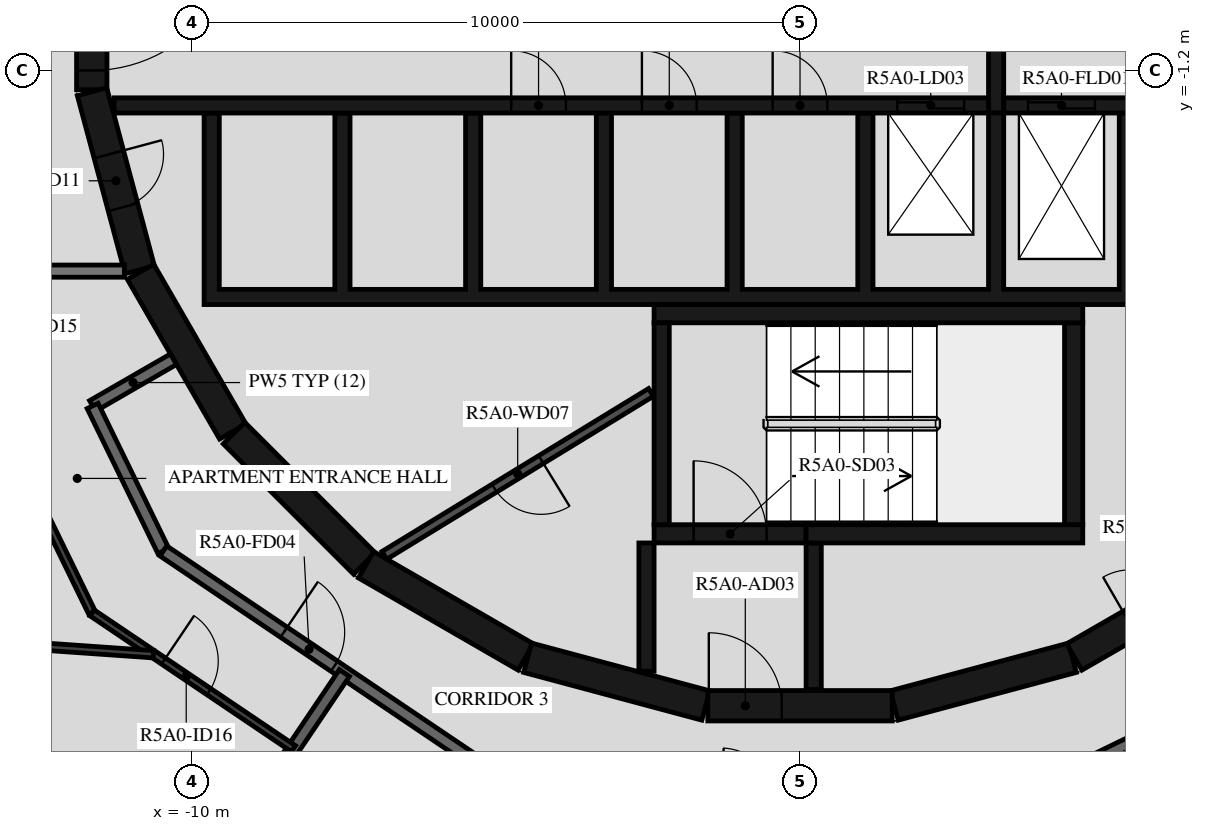
"""IFC4 building model, lengths in metres.
Left out: names, types, materials, properties, quantities, classifications, styles, units other than length and angle.
Written with IfcOpenShell. Run it as: python <this file> out.ifc"""

import sys

from ifc_helpers import new_model, si_unit, direction, frame, frame_2d, origin, place, context, subcontext, project, spatial, polyline, rectangle, outline, extrude, element, fill, save


model = new_model("IFC4")
c1 = context("Model", 3, precision=1e-05, world=origin(), true_north=direction((0.0, 1.0)))
c2 = subcontext(c1, "Body", "Model", "MODEL_VIEW")
j1 = project(units=[si_unit("LENGTHUNIT", "METRE"), si_unit("PLANEANGLEUNIT", "RADIAN")], contexts=[c1])
p1 = place(None, origin())
s1 = spatial("IfcSite", under=j1, at=p1, CompositionType="ELEMENT")
p2 = place(p1, origin())
s2 = spatial("IfcBuilding", under=s1, at=p2, CompositionType="ELEMENT")
p3 = place(p2, frame((0.0, 0.0, 188.4)))
s3 = spatial("IfcBuildingStorey", under=s2, at=p3, CompositionType="ELEMENT", Elevation=188.4)
p4 = place(p3, frame((1.55, -11.643, 0.0), z_axis=(0.0, 0.0, 1.0), x_axis=(0.965948410781, 0.258734743916, 0.0)))
e1 = element("IfcWall", 1, at=p4, inside=s3, PredefinedType="SHEAR", context=c2, shape_type="SweptSolid", body=[
    extrude(rectangle(XDim=3.033, YDim=0.5, at=frame_2d((1.516, 0.0))), origin(), (0.0, 0.0, 1.0), 3.12),
])
p5 = place(p3, frame((4.51, -10.845, 0.0), z_axis=(0.0, 0.0, 1.0), x_axis=(0.865975092491, 0.500087131594, 0.0)))
e2 = element("IfcWall", 2, at=p5, inside=s3, PredefinedType="SHEAR", context=c2, shape_type="SweptSolid", body=[
    extrude(rectangle(XDim=3.033, YDim=0.5, at=frame_2d((1.516, 0.0))), origin(), (0.0, 0.0, 1.0), 3.12),
])
p6 = place(p5, frame((1.066, 0.0, 0.0)))
e3 = element("IfcOpeningElement", 3, at=p6, cuts=e2, PredefinedType="OPENING", context=c2, shape_type="SweptSolid", body=[
    extrude(rectangle(XDim=0.9, YDim=2.1, at=frame_2d((0.45, 1.05))), frame((0.0, 0.26, 0.0), z_axis=(0.0, -1.0, 0.0), x_axis=(1.0, 0.0, 0.0)), (0.0, 0.0, 1.0), 0.52),
])
p7 = place(p3, frame((-11.647, 1.516, 0.0), z_axis=(0.0, 0.0, 1.0), x_axis=(0.0, -1.0, 0.0)))
e4 = element("IfcWall", 4, at=p7, inside=s3, PredefinedType="SHEAR", context=c2, shape_type="SweptSolid", body=[
    extrude(rectangle(XDim=3.033, YDim=0.5, at=frame_2d((1.516, 0.0))), origin(), (0.0, 0.0, 1.0), 3.12),
])
p8 = place(p7, frame((0.316, 0.0, 0.0)))
e5 = element("IfcOpeningElement", 5, at=p8, cuts=e4, PredefinedType="OPENING", context=c2, shape_type="SweptSolid", body=[
    extrude(rectangle(XDim=2.4, YDim=2.1, at=frame_2d((1.2, 1.05))), frame((0.0, 0.26, 0.0), z_axis=(0.0, -1.0, 0.0), x_axis=(1.0, 0.0, 0.0)), (0.0, 0.0, 1.0), 0.52),
])
p9 = place(p3, frame((-11.643, -1.55, 0.0), z_axis=(0.0, 0.0, 1.0), x_axis=(0.258734743916, -0.965948410781, 0.0)))
e6 = element("IfcWall", 6, at=p9, inside=s3, PredefinedType="SHEAR", context=c2, shape_type="SweptSolid", body=[
    extrude(rectangle(XDim=3.033, YDim=0.5, at=frame_2d((1.516, 0.0))), origin(), (0.0, 0.0, 1.0), 3.12),
])
p10 = place(p9, frame((1.066, 0.0, 0.0)))
e7 = element("IfcOpeningElement", 7, at=p10, cuts=e6, PredefinedType="OPENING", context=c2, shape_type="SweptSolid", body=[
    extrude(rectangle(XDim=0.9, YDim=2.1, at=frame_2d((0.45, 1.05))), frame((0.0, 0.26, 0.0), z_axis=(0.0, -1.0, 0.0), x_axis=(1.0, 0.0, 0.0)), (0.0, 0.0, 1.0), 0.52),
])
p11 = place(p3, frame((-10.845, -4.51, 0.0), z_axis=(0.0, 0.0, 1.0), x_axis=(0.500087131594, -0.865975092491, 0.0)))
e8 = element("IfcWall", 8, at=p11, inside=s3, PredefinedType="SHEAR", context=c2, shape_type="SweptSolid", body=[
    extrude(rectangle(XDim=3.033, YDim=0.5, at=frame_2d((1.516, 0.0))), origin(), (0.0, 0.0, 1.0), 3.12),
])
p12 = place(p3, frame((-9.308, -7.164, 0.0), z_axis=(0.0, 0.0, 1.0), x_axis=(0.707106781187, -0.707106781187, 0.0)))
e9 = element("IfcWall", 9, at=p12, inside=s3, PredefinedType="SHEAR", context=c2, shape_type="SweptSolid", body=[
    extrude(rectangle(XDim=3.032, YDim=0.5, at=frame_2d((1.516, 0.0))), origin(), (0.0, 0.0, 1.0), 3.12),
])
for number, where, z_axis, x_axis in (
    (10, (-7.137, -9.329, 0.0), (0.0, 0.0, 1.0), (0.866, -0.5, 0.0)),
    (11, (-4.479, -10.858, 0.0), (0.0, 0.0, 1.0), (0.966, -0.259, 0.0)),
):
    element("IfcWall", number, at=place(p3, frame(where, z_axis=z_axis, x_axis=x_axis)), inside=s3, PredefinedType="SHEAR", context=c2, shape_type="SweptSolid", body=[
        extrude(rectangle(XDim=3.033, YDim=0.5, at=frame_2d((1.516, 0.0))), origin(), (0.0, 0.0, 1.0), 3.12),
    ])
p13 = place(p3, frame((-1.516, -11.647, 0.0), z_axis=(0.0, 0.0, 1.0), x_axis=(1.0, 0.0, 0.0)))
e12 = element("IfcWall", 12, at=p13, inside=s3, PredefinedType="SHEAR", context=c2, shape_type="SweptSolid", body=[
    extrude(rectangle(XDim=3.033, YDim=0.5, at=frame_2d((1.516, 0.0))), origin(), (0.0, 0.0, 1.0), 3.12),
])
p14 = place(p13, frame((0.016, 0.0, 0.0)))
e13 = element("IfcOpeningElement", 13, at=p14, cuts=e12, PredefinedType="OPENING", context=c2, shape_type="SweptSolid", body=[
    extrude(rectangle(XDim=1.2, YDim=2.1, at=frame_2d((0.6, 1.05))), frame((0.0, 0.26, 0.0), z_axis=(0.0, -1.0, 0.0), x_axis=(1.0, 0.0, 0.0)), (0.0, 0.0, 1.0), 0.52),
])
p15 = place(p3, frame((-2.275, -8.67, 0.0), z_axis=(0.0, 0.0, 1.0), x_axis=(0.0, 1.0, 0.0)))
e14 = element("IfcWall", 14, at=p15, inside=s3, PredefinedType="SHEAR", context=c2, shape_type="SweptSolid", body=[
    extrude(rectangle(XDim=3.32, YDim=0.25, at=frame_2d((1.66, 0.0))), origin(), (0.0, 0.0, 1.0), 3.12),
])
p16 = place(p3, frame((-2.4, -5.2, 0.0), z_axis=(0.0, 0.0, 1.0), x_axis=(1.0, 0.0, 0.0)))
e15 = element("IfcWall", 15, at=p16, inside=s3, PredefinedType="SHEAR", context=c2, shape_type="SweptSolid", body=[
    extrude(rectangle(XDim=7.05, YDim=0.3, at=frame_2d((3.525, 0.0))), origin(), (0.0, 0.0, 1.0), 3.12),
])
p17 = place(p3, frame((4.5, -8.67, 0.0), z_axis=(0.0, 0.0, 1.0), x_axis=(0.0, 1.0, 0.0)))
e16 = element("IfcWall", 16, at=p17, inside=s3, PredefinedType="SHEAR", context=c2, shape_type="SweptSolid", body=[
    extrude(rectangle(XDim=3.32, YDim=0.3, at=frame_2d((1.66, 0.0))), origin(), (0.0, 0.0, 1.0), 3.12),
])
p18 = place(p3, frame((0.1, -8.82, 0.0), z_axis=(0.0, 0.0, 1.0), x_axis=(1.0, 0.0, 0.0)))
e17 = element("IfcWall", 17, at=p18, inside=s3, PredefinedType="SHEAR", context=c2, shape_type="SweptSolid", body=[
    extrude(rectangle(XDim=4.55, YDim=0.3, at=frame_2d((2.275, 0.0))), origin(), (0.0, 0.0, 1.0), 3.12),
])
p19 = place(p3, frame((-2.4, -8.82, 0.0), z_axis=(0.0, 0.0, 1.0), x_axis=(1.0, 0.0, 0.0)))
e18 = element("IfcWall", 18, at=p19, inside=s3, PredefinedType="SHEAR", context=c2, shape_type="SweptSolid", body=[
    extrude(rectangle(XDim=2.5, YDim=0.3, at=frame_2d((1.25, 0.0))), origin(), (0.0, 0.0, 1.0), 3.12),
])
p20 = place(p19, frame((0.65, 0.0, 0.0)))
e19 = element("IfcOpeningElement", 19, at=p20, cuts=e18, PredefinedType="OPENING", context=c2, shape_type="SweptSolid", body=[
    extrude(rectangle(XDim=1.2, YDim=2.1, at=frame_2d((0.6, 1.05))), frame((0.0, 0.16, 0.0), z_axis=(0.0, -1.0, 0.0), x_axis=(1.0, 0.0, 0.0)), (0.0, 0.0, 1.0), 0.32),
])
p21 = place(p3, frame((-2.525, -8.97, 0.0), z_axis=(0.0, 0.0, 1.0), x_axis=(0.0, -1.0, 0.0)))
e20 = element("IfcWall", 20, at=p21, inside=s3, PredefinedType="SHEAR", context=c2, shape_type="SweptSolid", body=[
    extrude(rectangle(XDim=2.11, YDim=0.25, at=frame_2d((1.055, 0.0))), origin(), (0.0, 0.0, 1.0), 3.12),
])
p22 = place(p3, frame((0.225, -8.97, 0.0), z_axis=(0.0, 0.0, 1.0), x_axis=(0.0, -1.0, 0.0)))
e21 = element("IfcWall", 21, at=p22, inside=s3, PredefinedType="SHEAR", context=c2, shape_type="SweptSolid", body=[
    extrude(rectangle(XDim=2.41, YDim=0.25, at=frame_2d((1.205, 0.0))), origin(), (0.0, 0.0, 1.0), 3.12),
])
p23 = place(p3, origin())
e22 = element("IfcWall", 22, at=p23, inside=s3, PredefinedType="SHEAR", context=c2, shape_type="SweptSolid", body=[
    extrude(outline(polyline([(9.8, -5.05), (9.8, -4.8), (9.8, -1.9), (9.55, -1.9), (9.55, -4.8), (7.65, -4.8), (7.65, -1.9), (7.4, -1.9), (7.4, -4.8), (5.5, -4.8), (5.5, -1.9), (5.25, -1.9), (5.25, -4.8), (3.35, -4.8), (3.35, -1.9), (3.1, -1.9), (3.1, -4.8), (1.2, -4.8), (1.2, -1.9), (0.95, -1.9), (0.95, -4.8), (-0.95, -4.8), (-0.95, -1.9), (-1.2, -1.9), (-1.2, -4.8), (-3.1, -4.8), (-3.1, -1.9), (-3.35, -1.9), (-3.35, -4.8), (-5.25, -4.8), (-5.25, -1.9), (-5.5, -1.9), (-5.5, -4.8), (-7.4, -4.8), (-7.4, -1.9), (-7.65, -1.9), (-7.65, -4.8), (-9.55, -4.8), (-9.55, -1.9), (-9.8, -1.9), (-9.8, -4.8), (-9.8, -5.05), (9.8, -5.05)])), origin(), (0.0, 0.0, 1.0), 3.12),
])
p24 = place(p3, frame((-11.28, -1.775, 0.0), z_axis=(0.0, 0.0, 1.0), x_axis=(1.0, 0.0, 0.0)))
e23 = element("IfcWall", 23, at=p24, inside=s3, PredefinedType="SHEAR", context=c2, shape_type="SweptSolid", body=[
    extrude(rectangle(XDim=14.38, YDim=0.25, at=frame_2d((7.19, 0.0))), origin(), (0.0, 0.0, 1.0), 3.12),
])
p25 = place(p24, frame((12.88, 0.0, 0.0)))
e24 = element("IfcOpeningElement", 24, at=p25, cuts=e23, PredefinedType="OPENING", context=c2, shape_type="SweptSolid", body=[
    extrude(rectangle(XDim=1.1, YDim=2.1, at=frame_2d((0.55, 1.05))), frame((0.0, 0.135, 0.0), z_axis=(0.0, -1.0, 0.0), x_axis=(1.0, 0.0, 0.0)), (0.0, 0.0, 1.0), 0.27),
])
p26 = place(p24, frame((6.53, 0.0, 0.0)))
e25 = element("IfcOpeningElement", 25, at=p26, cuts=e23, PredefinedType="OPENING", context=c2, shape_type="SweptSolid", body=[
    extrude(rectangle(XDim=0.9, YDim=2.1, at=frame_2d((0.45, 1.05))), frame((0.0, 0.135, 0.0), z_axis=(0.0, -1.0, 0.0), x_axis=(1.0, 0.0, 0.0)), (0.0, 0.0, 1.0), 0.27),
])
p27 = place(p24, frame((8.68, 0.0, 0.0)))
e26 = element("IfcOpeningElement", 26, at=p27, cuts=e23, PredefinedType="OPENING", context=c2, shape_type="SweptSolid", body=[
    extrude(rectangle(XDim=0.9, YDim=2.1, at=frame_2d((0.45, 1.05))), frame((0.0, 0.135, 0.0), z_axis=(0.0, -1.0, 0.0), x_axis=(1.0, 0.0, 0.0)), (0.0, 0.0, 1.0), 0.27),
])
p28 = place(p24, frame((10.83, 0.0, 0.0)))
e27 = element("IfcOpeningElement", 27, at=p28, cuts=e23, PredefinedType="OPENING", context=c2, shape_type="SweptSolid", body=[
    extrude(rectangle(XDim=0.9, YDim=2.1, at=frame_2d((0.45, 1.05))), frame((0.0, 0.135, 0.0), z_axis=(0.0, -1.0, 0.0), x_axis=(1.0, 0.0, 0.0)), (0.0, 0.0, 1.0), 0.27),
])
p29 = place(p3, frame((3.35, -1.775, 0.0), z_axis=(0.0, 0.0, 1.0), x_axis=(1.0, 0.0, 0.0)))
e28 = element("IfcWall", 28, at=p29, inside=s3, PredefinedType="SHEAR", context=c2, shape_type="SweptSolid", body=[
    extrude(rectangle(XDim=7.93, YDim=0.25, at=frame_2d((3.965, 0.0))), origin(), (0.0, 0.0, 1.0), 3.12),
])
p30 = place(p29, frame((0.4, 0.0, 0.0)))
e29 = element("IfcOpeningElement", 29, at=p30, cuts=e28, PredefinedType="OPENING", context=c2, shape_type="SweptSolid", body=[
    extrude(rectangle(XDim=1.1, YDim=2.4, at=frame_2d((0.55, 1.2))), frame((0.0, 0.135, 0.0), z_axis=(0.0, -1.0, 0.0), x_axis=(1.0, 0.0, 0.0)), (0.0, 0.0, 1.0), 0.27),
])
p31 = place(p29, frame((2.55, 0.0, 0.0)))
e30 = element("IfcOpeningElement", 30, at=p31, cuts=e28, PredefinedType="OPENING", context=c2, shape_type="SweptSolid", body=[
    extrude(rectangle(XDim=1.1, YDim=2.4, at=frame_2d((0.55, 1.2))), frame((0.0, 0.135, 0.0), z_axis=(0.0, -1.0, 0.0), x_axis=(1.0, 0.0, 0.0)), (0.0, 0.0, 1.0), 0.27),
])
p32 = place(p29, frame((4.7, 0.0, 0.0)))
e31 = element("IfcOpeningElement", 31, at=p32, cuts=e28, PredefinedType="OPENING", context=c2, shape_type="SweptSolid", body=[
    extrude(rectangle(XDim=1.1, YDim=2.4, at=frame_2d((0.55, 1.2))), frame((0.0, 0.135, 0.0), z_axis=(0.0, -1.0, 0.0), x_axis=(1.0, 0.0, 0.0)), (0.0, 0.0, 1.0), 0.27),
])
p33 = place(p3, frame((3.225, -1.9, 0.0), z_axis=(0.0, 0.0, 1.0), x_axis=(0.0, 1.0, 0.0)))
e32 = element("IfcWall", 32, at=p33, inside=s3, PredefinedType="SHEAR", context=c2, shape_type="SweptSolid", body=[
    extrude(rectangle(XDim=3.8, YDim=0.25, at=frame_2d((1.9, 0.0))), origin(), (0.0, 0.0, 1.0), 3.12),
])
p34 = place(p3, frame((-2.451, -6.495, 0.0), z_axis=(0.0, 0.0, 1.0), x_axis=(-0.853250115418, -0.521501908471, 0.0)))
e33 = element("IfcWall", 33, at=p34, inside=s3, PredefinedType="PARTITIONING", context=c2, shape_type="SweptSolid", body=[
    extrude(rectangle(XDim=5.137, YDim=0.15, at=frame_2d((2.569, 0.0))), origin(), (0.0, 0.0, 1.0), 3.12),
])
p35 = place(p34, frame((2.119, 0.0, 0.0)))
e34 = element("IfcOpeningElement", 34, at=p35, cuts=e33, PredefinedType="OPENING", context=c2, shape_type="SweptSolid", body=[
    extrude(rectangle(XDim=0.9, YDim=2.1, at=frame_2d((0.45, 1.05))), frame((0.0, 0.085, 0.0), z_axis=(0.0, -1.0, 0.0), x_axis=(1.0, 0.0, 0.0)), (0.0, 0.0, 1.0), 0.17),
])
p36 = place(p3, frame((-10.303, -5.949, 0.0), z_axis=(0.0, 0.0, 1.0), x_axis=(-0.866042588199, -0.499970234539, 0.0)))
e35 = element("IfcWall", 35, at=p36, inside=s3, PredefinedType="STANDARD", context=c2, shape_type="SweptSolid", body=[
    extrude(rectangle(XDim=1.535, YDim=0.2, at=frame_2d((0.768, 0.0))), origin(), (0.0, 0.0, 1.0), 3.12),
])
p37 = place(p3, frame((-11.633, -6.716, 0.0), z_axis=(0.0, 0.0, 1.0), x_axis=(0.438322116278, -0.898817958422, 0.0)))
e36 = element("IfcWall", 36, at=p37, inside=s3, PredefinedType="STANDARD", context=c2, shape_type="SweptSolid", body=[
    extrude(rectangle(XDim=2.654, YDim=0.2, at=frame_2d((1.327, 0.0))), origin(), (0.0, 0.0, 1.0), 3.12),
])
p38 = place(p3, frame((-10.47, -9.101, 0.0), z_axis=(0.0, 0.0, 1.0), x_axis=(0.829035841718, -0.559195469534, 0.0)))
e37 = element("IfcWall", 37, at=p38, inside=s3, PredefinedType="STANDARD", context=c2, shape_type="SweptSolid", body=[
    extrude(rectangle(XDim=7.181, YDim=0.2, at=frame_2d((3.591, 0.0))), origin(), (0.0, 0.0, 1.0), 3.12),
])
p39 = place(p38, frame((2.39, 0.0, 0.0)))
e38 = element("IfcOpeningElement", 38, at=p39, cuts=e37, PredefinedType="OPENING", context=c2, shape_type="SweptSolid", body=[
    extrude(rectangle(XDim=1.0, YDim=2.1, at=frame_2d((0.5, 1.05))), frame((0.0, 0.11, 0.0), z_axis=(0.0, -1.0, 0.0), x_axis=(1.0, 0.0, 0.0)), (0.0, 0.0, 1.0), 0.22),
])
p40 = place(p3, frame((2.647, -13.618, 0.0), z_axis=(0.0, 0.0, 1.0), x_axis=(0.898796543751, 0.438366026218, 0.0)))
e39 = element("IfcWall", 39, at=p40, inside=s3, PredefinedType="STANDARD", context=c2, shape_type="SweptSolid", body=[
    extrude(rectangle(XDim=7.181, YDim=0.2, at=frame_2d((3.591, 0.0))), origin(), (0.0, 0.0, 1.0), 3.12),
])
p41 = place(p40, frame((0.2, 0.0, 0.0)))
e40 = element("IfcOpeningElement", 40, at=p41, cuts=e39, PredefinedType="OPENING", context=c2, shape_type="SweptSolid", body=[
    extrude(rectangle(XDim=1.0, YDim=2.1, at=frame_2d((0.5, 1.05))), frame((0.0, 0.11, 0.0), z_axis=(0.0, -1.0, 0.0), x_axis=(1.0, 0.0, 0.0)), (0.0, 0.0, 1.0), 0.22),
])
p42 = place(p3, frame((-17.9, -4.5, 0.0), z_axis=(0.0, 0.0, 1.0), x_axis=(1.0, 0.0, 0.0)))
e41 = element("IfcWall", 41, at=p42, inside=s3, PredefinedType="STANDARD", context=c2, shape_type="SweptSolid", body=[
    extrude(rectangle(XDim=6.789, YDim=0.2, at=frame_2d((3.394, 0.0))), origin(), (0.0, 0.0, 1.0), 3.12),
])
p43 = place(p3, frame((-10.407, -15.43, 0.0), z_axis=(0.0, 0.0, 1.0), x_axis=(0.559038328133, 0.829141813973, 0.0)))
e42 = element("IfcWall", 42, at=p43, inside=s3, PredefinedType="STANDARD", context=c2, shape_type="SweptSolid", body=[
    extrude(rectangle(XDim=5.212, YDim=0.2, at=frame_2d((2.606, 0.0))), origin(), (0.0, 0.0, 1.0), 3.12),
])
p44 = place(p3, frame((-13.715, -5.87, 0.0), z_axis=(0.0, 0.0, 1.0), x_axis=(0.438372766482, -0.89879325632, 0.0)))
e43 = element("IfcWall", 43, at=p44, inside=s3, PredefinedType="PARTITIONING", context=c2, shape_type="SweptSolid", body=[
    extrude(rectangle(XDim=4.728, YDim=0.12, at=frame_2d((2.364, 0.0))), origin(), (0.0, 0.0, 1.0), 3.12),
])
p45 = place(p44, frame((0.4, 0.0, 0.0)))
e44 = element("IfcOpeningElement", 44, at=p45, cuts=e43, PredefinedType="OPENING", context=c2, shape_type="SweptSolid", body=[
    extrude(rectangle(XDim=0.9, YDim=2.1, at=frame_2d((0.45, 1.05))), frame((0.0, 0.07, 0.0), z_axis=(0.0, -1.0, 0.0), x_axis=(1.0, 0.0, 0.0)), (0.0, 0.0, 1.0), 0.14),
])
p46 = place(p3, frame((-11.642, -10.12, 0.0), z_axis=(0.0, 0.0, 1.0), x_axis=(0.829018066952, -0.559221820629, 0.0)))
e45 = element("IfcWall", 45, at=p46, inside=s3, PredefinedType="PARTITIONING", context=c2, shape_type="SweptSolid", body=[
    extrude(rectangle(XDim=3.992, YDim=0.12, at=frame_2d((1.996, 0.0))), origin(), (0.0, 0.0, 1.0), 3.12),
])
p47 = place(p46, frame((1.417, 0.0, 0.0)))
e46 = element("IfcOpeningElement", 46, at=p47, cuts=e45, PredefinedType="OPENING", context=c2, shape_type="SweptSolid", body=[
    extrude(rectangle(XDim=0.9, YDim=2.1, at=frame_2d((0.45, 1.05))), frame((0.0, 0.07, 0.0), z_axis=(0.0, -1.0, 0.0), x_axis=(1.0, 0.0, 0.0)), (0.0, 0.0, 1.0), 0.14),
])
p48 = place(p3, frame((-14.551, -10.527, 0.0), z_axis=(0.0, 0.0, 1.0), x_axis=(0.997564247633, -0.069753651118, 0.0)))
e47 = element("IfcWall", 47, at=p48, inside=s3, PredefinedType="PARTITIONING", context=c2, shape_type="SweptSolid", body=[
    extrude(rectangle(XDim=3.927, YDim=0.12, at=frame_2d((1.963, 0.0))), origin(), (0.0, 0.0, 1.0), 3.12),
])
p49 = place(p3, frame((3.074, -15.078, 0.0), z_axis=(0.0, 0.0, 1.0), x_axis=(0.898800770739, 0.438357359377, 0.0)))
e48 = element("IfcWall", 48, at=p49, inside=s3, PredefinedType="PARTITIONING", context=c2, shape_type="SweptSolid", body=[
    extrude(rectangle(XDim=7.694, YDim=0.12, at=frame_2d((3.847, 0.0))), origin(), (0.0, 0.0, 1.0), 3.12),
])
p50 = place(p49, frame((0.2, 0.0, 0.0)))
e49 = element("IfcOpeningElement", 49, at=p50, cuts=e48, PredefinedType="OPENING", context=c2, shape_type="SweptSolid", body=[
    extrude(rectangle(XDim=0.9, YDim=2.1, at=frame_2d((0.45, 1.05))), frame((0.0, 0.07, 0.0), z_axis=(0.0, -1.0, 0.0), x_axis=(1.0, 0.0, 0.0)), (0.0, 0.0, 1.0), 0.14),
])
p51 = place(p20, origin())
e50 = element("IfcDoor", 50, at=p51, inside=s3, OperationType="SINGLE_SWING_LEFT", PredefinedType="DOOR", context=c2, shape_type="SweptSolid", body=[
    extrude(rectangle(XDim=1.2, YDim=2.1, at=frame_2d((0.6, 1.05))), frame((0.0, 0.025, 0.0), z_axis=(0.0, -1.0, 0.0), x_axis=(1.0, 0.0, 0.0)), (0.0, 0.0, 1.0), 0.05),
])
fill(e19, e50)
p52 = place(p14, origin())
e51 = element("IfcDoor", 51, at=p52, inside=s3, OperationType="SINGLE_SWING_RIGHT", PredefinedType="DOOR", context=c2, shape_type="SweptSolid", body=[
    extrude(rectangle(XDim=1.2, YDim=2.1, at=frame_2d((0.6, 1.05))), frame((0.0, 0.025, 0.0), z_axis=(0.0, -1.0, 0.0), x_axis=(1.0, 0.0, 0.0)), (0.0, 0.0, 1.0), 0.05),
])
fill(e13, e51)
p53 = place(p8, origin())
e52 = element("IfcDoor", 52, at=p53, inside=s3, OperationType="DOUBLE_DOOR_SINGLE_SWING", PredefinedType="DOOR", context=c2, shape_type="SweptSolid", body=[
    extrude(rectangle(XDim=2.4, YDim=2.1, at=frame_2d((1.2, 1.05))), frame((0.0, 0.025, 0.0), z_axis=(0.0, -1.0, 0.0), x_axis=(1.0, 0.0, 0.0)), (0.0, 0.0, 1.0), 0.05),
])
fill(e5, e52)
p54 = place(p25, origin())
e53 = element("IfcDoor", 53, at=p54, inside=s3, OperationType="DOUBLE_DOOR_SLIDING", PredefinedType="DOOR", context=c2, shape_type="SweptSolid", body=[
    extrude(rectangle(XDim=1.1, YDim=2.1, at=frame_2d((0.55, 1.05))), frame((0.0, 0.025, 0.0), z_axis=(0.0, -1.0, 0.0), x_axis=(1.0, 0.0, 0.0)), (0.0, 0.0, 1.0), 0.05),
])
fill(e24, e53)
p55 = place(p30, origin())
e54 = element("IfcDoor", 54, at=p55, inside=s3, OperationType="DOUBLE_DOOR_SLIDING", PredefinedType="DOOR", context=c2, shape_type="SweptSolid", body=[
    extrude(rectangle(XDim=1.1, YDim=2.4, at=frame_2d((0.55, 1.2))), frame((0.0, 0.025, 0.0), z_axis=(0.0, -1.0, 0.0), x_axis=(1.0, 0.0, 0.0)), (0.0, 0.0, 1.0), 0.05),
])
fill(e29, e54)
p56 = place(p26, origin())
e55 = element("IfcDoor", 55, at=p56, inside=s3, OperationType="SINGLE_SWING_RIGHT", PredefinedType="DOOR", context=c2, shape_type="SweptSolid", body=[
    extrude(rectangle(XDim=0.9, YDim=2.1, at=frame_2d((0.45, 1.05))), frame((0.0, 0.025, 0.0), z_axis=(0.0, -1.0, 0.0), x_axis=(1.0, 0.0, 0.0)), (0.0, 0.0, 1.0), 0.05),
])
fill(e25, e55)
p57 = place(p27, origin())
e56 = element("IfcDoor", 56, at=p57, inside=s3, OperationType="SINGLE_SWING_LEFT", PredefinedType="DOOR", context=c2, shape_type="SweptSolid", body=[
    extrude(rectangle(XDim=0.9, YDim=2.1, at=frame_2d((0.45, 1.05))), frame((0.0, 0.025, 0.0), z_axis=(0.0, -1.0, 0.0), x_axis=(1.0, 0.0, 0.0)), (0.0, 0.0, 1.0), 0.05),
])
fill(e26, e56)
p58 = place(p28, origin())
e57 = element("IfcDoor", 57, at=p58, inside=s3, OperationType="SINGLE_SWING_RIGHT", PredefinedType="DOOR", context=c2, shape_type="SweptSolid", body=[
    extrude(rectangle(XDim=0.9, YDim=2.1, at=frame_2d((0.45, 1.05))), frame((0.0, 0.025, 0.0), z_axis=(0.0, -1.0, 0.0), x_axis=(1.0, 0.0, 0.0)), (0.0, 0.0, 1.0), 0.05),
])
fill(e27, e57)
p59 = place(p35, origin())
e58 = element("IfcDoor", 58, at=p59, inside=s3, OperationType="SINGLE_SWING_LEFT", PredefinedType="DOOR", context=c2, shape_type="SweptSolid", body=[
    extrude(rectangle(XDim=0.9, YDim=2.1, at=frame_2d((0.45, 1.05))), frame((0.0, 0.025, 0.0), z_axis=(0.0, -1.0, 0.0), x_axis=(1.0, 0.0, 0.0)), (0.0, 0.0, 1.0), 0.05),
])
fill(e34, e58)
p60 = place(p10, origin())
e59 = element("IfcDoor", 59, at=p60, inside=s3, OperationType="SINGLE_SWING_LEFT", PredefinedType="DOOR", context=c2, shape_type="SweptSolid", body=[
    extrude(rectangle(XDim=0.9, YDim=2.1, at=frame_2d((0.45, 1.05))), frame((0.0, 0.025, 0.0), z_axis=(0.0, -1.0, 0.0), x_axis=(1.0, 0.0, 0.0)), (0.0, 0.0, 1.0), 0.05),
])
fill(e7, e59)
p61 = place(p39, origin())
e60 = element("IfcDoor", 60, at=p61, inside=s3, OperationType="SINGLE_SWING_RIGHT", PredefinedType="DOOR", context=c2, shape_type="SweptSolid", body=[
    extrude(rectangle(XDim=1.0, YDim=2.1, at=frame_2d((0.5, 1.05))), frame((0.0, 0.025, 0.0), z_axis=(0.0, -1.0, 0.0), x_axis=(1.0, 0.0, 0.0)), (0.0, 0.0, 1.0), 0.05),
])
fill(e38, e60)
p62 = place(p47, origin())
e61 = element("IfcDoor", 61, at=p62, inside=s3, OperationType="SINGLE_SWING_RIGHT", PredefinedType="DOOR", context=c2, shape_type="SweptSolid", body=[
    extrude(rectangle(XDim=0.9, YDim=2.1, at=frame_2d((0.45, 1.05))), frame((0.0, 0.025, 0.0), z_axis=(0.0, -1.0, 0.0), x_axis=(1.0, 0.0, 0.0)), (0.0, 0.0, 1.0), 0.05),
])
fill(e46, e61)
save(model, sys.argv[1])
